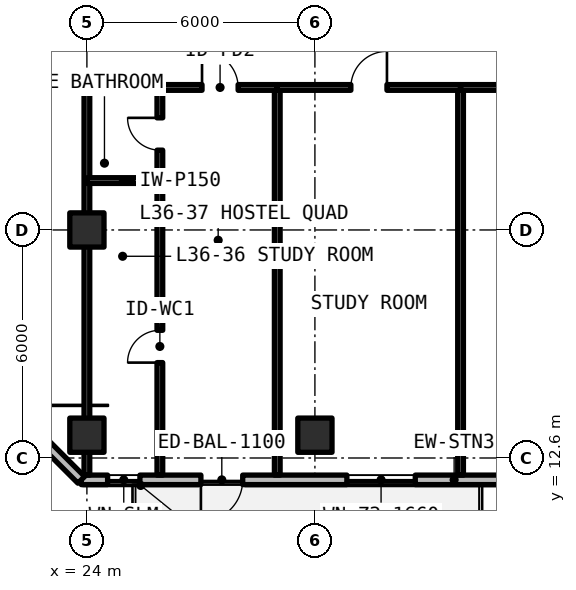
"""IFC4 building model, lengths in metres.
Left out: names, types, materials, properties, quantities, classifications, styles, units other than length and angle.
Written with IfcOpenShell. Run it as: python <this file> out.ifc"""

import sys

from ifc_helpers import new_model, si_unit, direction, frame, frame_2d, origin, origin_2d, place, context, subcontext, project, spatial, rectangle, extrude, element, fill, save


model = new_model("IFC4")
c1 = context("Model", 3, precision=1e-05, world=origin(), true_north=direction((0.0, 1.0)))
c2 = subcontext(c1, "Body", "Model", "MODEL_VIEW")
j1 = project(units=[si_unit("LENGTHUNIT", "METRE"), si_unit("PLANEANGLEUNIT", "RADIAN")], contexts=[c1])
p1 = place(None, origin())
s1 = spatial("IfcSite", under=j1, at=p1, CompositionType="ELEMENT")
p2 = place(p1, origin())
s2 = spatial("IfcBuilding", under=s1, at=p2, CompositionType="ELEMENT")
p3 = place(p2, frame((0.0, 0.0, 132.0)))
s3 = spatial("IfcBuildingStorey", under=s2, at=p3, CompositionType="ELEMENT", Elevation=132.0)
for number, where, z_axis, x_axis in (
    (1, (24.0, 18.6, 0.0), (0.0, 0.0, 1.0), (1.0, 0.0, 0.0)),
    (2, (24.0, 13.2, 0.0), (0.0, 0.0, 1.0), (1.0, 0.0, 0.0)),
    (3, (30.0, 13.2, 0.0), (0.0, 0.0, 1.0), (1.0, 0.0, 0.0)),
):
    element("IfcColumn", number, at=place(p3, frame(where, z_axis=z_axis, x_axis=x_axis)), inside=s3, PredefinedType="COLUMN", context=c2, shape_type="SweptSolid", body=[
        extrude(rectangle(XDim=0.9, YDim=0.9, at=origin_2d()), origin(), (0.0, 0.0, 1.0), 3.3),
    ])
p4 = place(p3, frame((23.852, 12.025, 0.0), z_axis=(0.0, 0.0, 1.0), x_axis=(1.0, 0.0, 0.0)))
e4 = element("IfcWall", 4, at=p4, inside=s3, PredefinedType="SOLIDWALL", context=c2, shape_type="SweptSolid", body=[
    extrude(rectangle(XDim=19.623, YDim=0.25, at=frame_2d((9.812, 0.0))), origin(), (0.0, 0.0, 1.0), 3.08),
])
p5 = place(p4, frame((3.148, 0.0, 0.0)))
e5 = element("IfcOpeningElement", 5, at=p5, cuts=e4, PredefinedType="OPENING", context=c2, shape_type="SweptSolid", body=[
    extrude(rectangle(XDim=1.1, YDim=2.15, at=frame_2d((0.55, 1.075))), frame((0.0, 0.135, 0.0), z_axis=(0.0, -1.0, 0.0), x_axis=(1.0, 0.0, 0.0)), (0.0, 0.0, 1.0), 0.27),
])
p6 = place(p4, frame((0.693, 0.0, 0.78)))
e6 = element("IfcOpeningElement", 6, at=p6, cuts=e4, PredefinedType="OPENING", context=c2, shape_type="SweptSolid", body=[
    extrude(rectangle(XDim=0.85, YDim=1.65, at=frame_2d((0.425, 0.825))), frame((0.0, 0.135, 0.0), z_axis=(0.0, -1.0, 0.0), x_axis=(1.0, 0.0, 0.0)), (0.0, 0.0, 1.0), 0.27),
])
p7 = place(p4, frame((6.989, 0.0, 0.78)))
e7 = element("IfcOpeningElement", 7, at=p7, cuts=e4, PredefinedType="OPENING", context=c2, shape_type="SweptSolid", body=[
    extrude(rectangle(XDim=1.8, YDim=1.66, at=frame_2d((0.9, 0.83))), frame((0.0, 0.135, 0.0), z_axis=(0.0, -1.0, 0.0), x_axis=(1.0, 0.0, 0.0)), (0.0, 0.0, 1.0), 0.27),
])
p8 = place(p4, frame((13.065, 0.0, 0.78)))
e8 = element("IfcOpeningElement", 8, at=p8, cuts=e4, PredefinedType="OPENING", context=c2, shape_type="SweptSolid", body=[
    extrude(rectangle(XDim=1.4, YDim=1.65, at=frame_2d((0.7, 0.825))), frame((0.0, 0.135, 0.0), z_axis=(0.0, -1.0, 0.0), x_axis=(1.0, 0.0, 0.0)), (0.0, 0.0, 1.0), 0.27),
])
p9 = place(p4, frame((15.969, 0.0, 0.78)))
e9 = element("IfcOpeningElement", 9, at=p9, cuts=e4, PredefinedType="OPENING", context=c2, shape_type="SweptSolid", body=[
    extrude(rectangle(XDim=1.4, YDim=1.65, at=frame_2d((0.7, 0.825))), frame((0.0, 0.135, 0.0), z_axis=(0.0, -1.0, 0.0), x_axis=(1.0, 0.0, 0.0)), (0.0, 0.0, 1.0), 0.27),
])
p10 = place(p3, frame((19.725, 16.152, 0.0), z_axis=(0.0, 0.0, 1.0), x_axis=(0.70708586489, -0.707127696864, 0.0)))
e10 = element("IfcWall", 10, at=p10, inside=s3, PredefinedType="SOLIDWALL", context=c2, shape_type="SweptSolid", body=[
    extrude(rectangle(XDim=5.836, YDim=0.25, at=frame_2d((2.918, 0.0))), origin(), (0.0, 0.0, 1.0), 3.08),
])
p11 = place(p10, frame((0.898, 0.0, 0.78)))
e11 = element("IfcOpeningElement", 11, at=p11, cuts=e10, PredefinedType="OPENING", context=c2, shape_type="SweptSolid", body=[
    extrude(rectangle(XDim=3.4, YDim=1.66, at=frame_2d((1.7, 0.83))), frame((0.0, 0.135, 0.0), z_axis=(0.0, -1.0, 0.0), x_axis=(1.0, 0.0, 0.0)), (0.0, 0.0, 1.0), 0.27),
])
for number, where, z_axis, x_axis in (
    (12, (24.0, 12.15, 0.0), (0.0, 0.0, 1.0), (0.0, 1.0, 0.0)),
    (13, (29.009, 12.15, 0.0), (0.0, 0.0, 1.0), (0.0, 1.0, 0.0)),
):
    element("IfcWall", number, at=place(p3, frame(where, z_axis=z_axis, x_axis=x_axis)), inside=s3, PredefinedType="SOLIDWALL", context=c2, shape_type="SweptSolid", body=[
        extrude(rectangle(XDim=10.2, YDim=0.15, at=frame_2d((5.1, 0.0))), origin(), (0.0, 0.0, 1.0), 2.35),
    ])
p12 = place(p3, frame((24.0, 19.9, 0.0), z_axis=(0.0, 0.0, 1.0), x_axis=(1.0, 0.0, 0.0)))
e14 = element("IfcWall", 14, at=p12, inside=s3, PredefinedType="PARTITIONING", context=c2, shape_type="SweptSolid", body=[
    extrude(rectangle(XDim=1.92, YDim=0.15, at=frame_2d((0.96, 0.0))), origin(), (0.0, 0.0, 1.0), 2.35),
])
p13 = place(p3, frame((25.92, 12.15, 0.0), z_axis=(0.0, 0.0, 1.0), x_axis=(0.0, 1.0, 0.0)))
e15 = element("IfcWall", 15, at=p13, inside=s3, PredefinedType="PARTITIONING", context=c2, shape_type="SweptSolid", body=[
    extrude(rectangle(XDim=10.2, YDim=0.15, at=frame_2d((5.1, 0.0))), origin(), (0.0, 0.0, 1.0), 2.35),
])
p14 = place(p13, frame((2.96, 0.0, 0.0)))
e16 = element("IfcOpeningElement", 16, at=p14, cuts=e15, PredefinedType="OPENING", context=c2, shape_type="SweptSolid", body=[
    extrude(rectangle(XDim=0.85, YDim=2.1, at=frame_2d((0.425, 1.05))), frame((0.0, 0.085, 0.0), z_axis=(0.0, -1.0, 0.0), x_axis=(1.0, 0.0, 0.0)), (0.0, 0.0, 1.0), 0.17),
])
p15 = place(p13, frame((8.55, 0.0, 0.0)))
e17 = element("IfcOpeningElement", 17, at=p15, cuts=e15, PredefinedType="OPENING", context=c2, shape_type="SweptSolid", body=[
    extrude(rectangle(XDim=0.85, YDim=2.1, at=frame_2d((0.425, 1.05))), frame((0.0, 0.085, 0.0), z_axis=(0.0, -1.0, 0.0), x_axis=(1.0, 0.0, 0.0)), (0.0, 0.0, 1.0), 0.17),
])
p16 = place(p3, frame((24.0, 22.35, 0.0), z_axis=(0.0, 0.0, 1.0), x_axis=(1.0, 0.0, 0.0)))
e18 = element("IfcWall", 18, at=p16, inside=s3, PredefinedType="SOLIDWALL", context=c2, shape_type="SweptSolid", body=[
    extrude(rectangle(XDim=5.009, YDim=0.15, at=frame_2d((2.504, 0.0))), origin(), (0.0, 0.0, 1.0), 2.35),
])
p17 = place(p16, frame((3.03, 0.0, 0.0)))
e19 = element("IfcOpeningElement", 19, at=p17, cuts=e18, PredefinedType="OPENING", context=c2, shape_type="SweptSolid", body=[
    extrude(rectangle(XDim=0.95, YDim=2.15, at=frame_2d((0.475, 1.075))), frame((0.0, 0.085, 0.0), z_axis=(0.0, -1.0, 0.0), x_axis=(1.0, 0.0, 0.0)), (0.0, 0.0, 1.0), 0.17),
])
p18 = place(p3, frame((33.833, 12.15, 0.0), z_axis=(0.0, 0.0, 1.0), x_axis=(0.0, 1.0, 0.0)))
e20 = element("IfcWall", 20, at=p18, inside=s3, PredefinedType="SOLIDWALL", context=c2, shape_type="SweptSolid", body=[
    extrude(rectangle(XDim=10.2, YDim=0.15, at=frame_2d((5.1, 0.0))), origin(), (0.0, 0.0, 1.0), 2.35),
])
p19 = place(p3, frame((29.009, 22.35, 0.0), z_axis=(0.0, 0.0, 1.0), x_axis=(1.0, 0.0, 0.0)))
e21 = element("IfcWall", 21, at=p19, inside=s3, PredefinedType="SOLIDWALL", context=c2, shape_type="SweptSolid", body=[
    extrude(rectangle(XDim=4.824, YDim=0.15, at=frame_2d((2.412, 0.0))), origin(), (0.0, 0.0, 1.0), 2.35),
])
p20 = place(p19, frame((1.937, 0.0, 0.0)))
e22 = element("IfcOpeningElement", 22, at=p20, cuts=e21, PredefinedType="OPENING", context=c2, shape_type="SweptSolid", body=[
    extrude(rectangle(XDim=0.95, YDim=2.15, at=frame_2d((0.475, 1.075))), frame((0.0, 0.085, 0.0), z_axis=(0.0, -1.0, 0.0), x_axis=(1.0, 0.0, 0.0)), (0.0, 0.0, 1.0), 0.17),
])
p21 = place(p3, frame((33.833, 22.35, 0.0), z_axis=(0.0, 0.0, 1.0), x_axis=(1.0, 0.0, 0.0)))
e23 = element("IfcWall", 23, at=p21, inside=s3, PredefinedType="SOLIDWALL", context=c2, shape_type="SweptSolid", body=[
    extrude(rectangle(XDim=5.009, YDim=0.15, at=frame_2d((2.504, 0.0))), origin(), (0.0, 0.0, 1.0), 2.35),
])
p22 = place(p21, frame((2.03, 0.0, 0.0)))
e24 = element("IfcOpeningElement", 24, at=p22, cuts=e23, PredefinedType="OPENING", context=c2, shape_type="SweptSolid", body=[
    extrude(rectangle(XDim=0.95, YDim=2.15, at=frame_2d((0.475, 1.075))), frame((0.0, 0.085, 0.0), z_axis=(0.0, -1.0, 0.0), x_axis=(1.0, 0.0, 0.0)), (0.0, 0.0, 1.0), 0.17),
])
p23 = place(p5, frame((1.1, 0.0, 0.0), z_axis=(0.0, 0.0, 1.0), x_axis=(-1.0, 0.0, 0.0)))
e25 = element("IfcDoor", 25, at=p23, inside=s3, OperationType="SINGLE_SWING_RIGHT", PredefinedType="DOOR", context=c2, shape_type="SweptSolid", body=[
    extrude(rectangle(XDim=1.1, YDim=2.15, at=frame_2d((0.55, 1.075))), frame((0.0, 0.025, 0.0), z_axis=(0.0, -1.0, 0.0), x_axis=(1.0, 0.0, 0.0)), (0.0, 0.0, 1.0), 0.05),
])
fill(e5, e25)
p24 = place(p6, origin())
e26 = element("IfcWindow", 26, at=p24, inside=s3, PartitioningType="SINGLE_PANEL", PredefinedType="WINDOW", context=c2, shape_type="SweptSolid", body=[
    extrude(rectangle(XDim=0.85, YDim=1.65, at=frame_2d((0.425, 0.825))), frame((0.0, 0.03, 0.0), z_axis=(0.0, -1.0, 0.0), x_axis=(1.0, 0.0, 0.0)), (0.0, 0.0, 1.0), 0.06),
])
fill(e6, e26)
p25 = place(p7, origin())
e27 = element("IfcWindow", 27, at=p25, inside=s3, PartitioningType="SINGLE_PANEL", PredefinedType="WINDOW", context=c2, shape_type="SweptSolid", body=[
    extrude(rectangle(XDim=1.8, YDim=1.66, at=frame_2d((0.9, 0.83))), frame((0.0, 0.03, 0.0), z_axis=(0.0, -1.0, 0.0), x_axis=(1.0, 0.0, 0.0)), (0.0, 0.0, 1.0), 0.06),
])
fill(e7, e27)
p26 = place(p14, origin())
e28 = element("IfcDoor", 28, at=p26, inside=s3, OperationType="SINGLE_SWING_LEFT", PredefinedType="DOOR", context=c2, shape_type="SweptSolid", body=[
    extrude(rectangle(XDim=0.85, YDim=2.1, at=frame_2d((0.425, 1.05))), frame((0.0, 0.025, 0.0), z_axis=(0.0, -1.0, 0.0), x_axis=(1.0, 0.0, 0.0)), (0.0, 0.0, 1.0), 0.05),
])
fill(e16, e28)
p27 = place(p15, origin())
e29 = element("IfcDoor", 29, at=p27, inside=s3, OperationType="SINGLE_SWING_RIGHT", PredefinedType="DOOR", context=c2, shape_type="SweptSolid", body=[
    extrude(rectangle(XDim=0.85, YDim=2.1, at=frame_2d((0.425, 1.05))), frame((0.0, 0.025, 0.0), z_axis=(0.0, -1.0, 0.0), x_axis=(1.0, 0.0, 0.0)), (0.0, 0.0, 1.0), 0.05),
])
fill(e17, e29)
p28 = place(p17, origin())
e30 = element("IfcDoor", 30, at=p28, inside=s3, OperationType="SINGLE_SWING_LEFT", PredefinedType="DOOR", context=c2, shape_type="SweptSolid", body=[
    extrude(rectangle(XDim=0.95, YDim=2.15, at=frame_2d((0.475, 1.075))), frame((0.0, 0.025, 0.0), z_axis=(0.0, -1.0, 0.0), x_axis=(1.0, 0.0, 0.0)), (0.0, 0.0, 1.0), 0.05),
])
fill(e19, e30)
p29 = place(p20, origin())
e31 = element("IfcDoor", 31, at=p29, inside=s3, OperationType="SINGLE_SWING_RIGHT", PredefinedType="DOOR", context=c2, shape_type="SweptSolid", body=[
    extrude(rectangle(XDim=0.95, YDim=2.15, at=frame_2d((0.475, 1.075))), frame((0.0, 0.025, 0.0), z_axis=(0.0, -1.0, 0.0), x_axis=(1.0, 0.0, 0.0)), (0.0, 0.0, 1.0), 0.05),
])
fill(e22, e31)
save(model, sys.argv[1])
